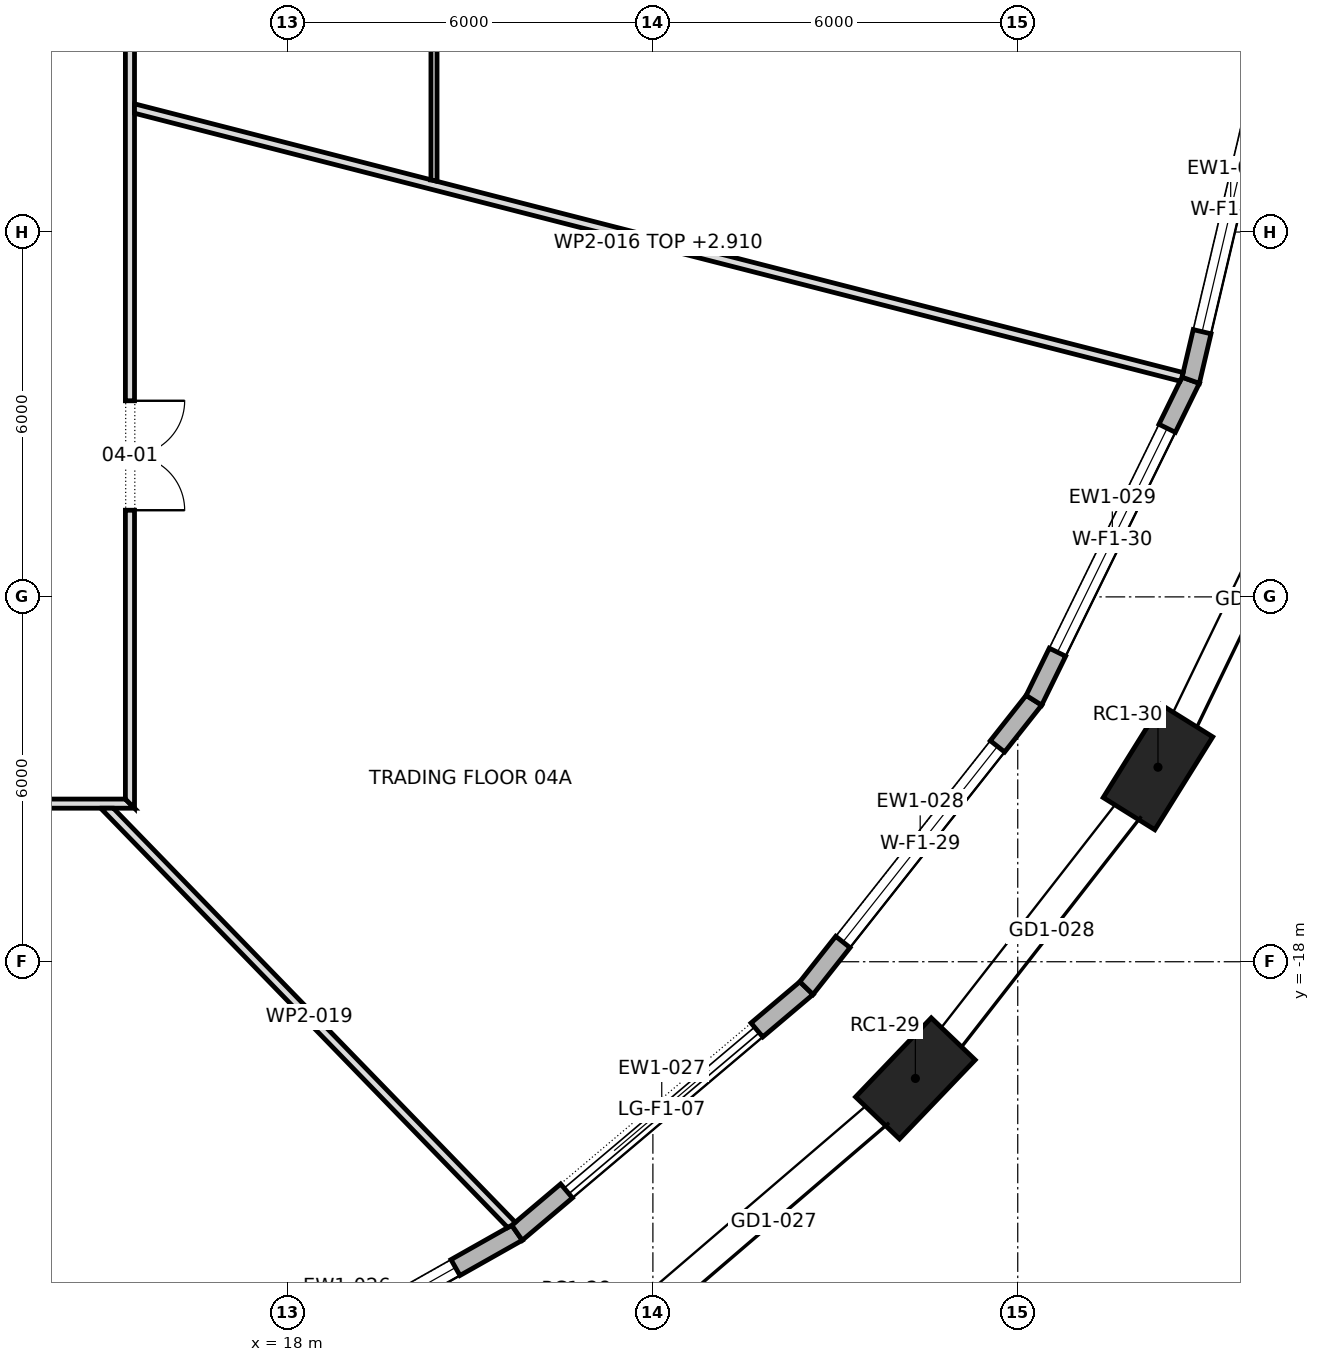
"""IFC4 building model, lengths in metres.
Left out: names, types, materials, properties, quantities, classifications, styles, units other than length and angle.
Written with IfcOpenShell. Run it as: python <this file> out.ifc"""

import sys

from ifc_helpers import new_model, si_unit, direction, frame, frame_2d, origin, origin_2d, place, context, subcontext, project, spatial, polyline, rectangle, outline, extrude, element, fill, save


model = new_model("IFC4")
c1 = context("Model", 3, precision=1e-05, world=origin(), true_north=direction((0.0, 1.0)))
c2 = subcontext(c1, "Body", "Model", "MODEL_VIEW")
j1 = project(units=[si_unit("LENGTHUNIT", "METRE"), si_unit("PLANEANGLEUNIT", "RADIAN")], contexts=[c1])
p1 = place(None, origin())
s1 = spatial("IfcSite", under=j1, at=p1, CompositionType="ELEMENT")
p2 = place(p1, origin())
s2 = spatial("IfcBuilding", under=s1, at=p2, CompositionType="ELEMENT")
p3 = place(p2, frame((0.0, 0.0, 69.7)))
s3 = spatial("IfcBuildingStorey", under=s2, at=p3, CompositionType="ELEMENT", Elevation=69.7)
for number, where, z_axis, x_axis in (
    (1, (28.317, -19.919, 0.0), (0.0, 0.0, 1.0), (0.692, 0.722, 0.0)),
    (2, (32.306, -14.801, 0.0), (0.0, 0.0, 1.0), (0.529, 0.849, 0.0)),
):
    element("IfcColumn", number, at=place(p3, frame(where, z_axis=z_axis, x_axis=x_axis)), inside=s3, PredefinedType="COLUMN", context=c2, shape_type="SweptSolid", body=[
        extrude(rectangle(XDim=1.8, YDim=1.0, at=origin_2d()), origin(), (0.0, 0.0, 1.0), 4.2),
    ])
p4 = place(p3, frame((16.172, -25.617, 0.0), z_axis=(0.0, 0.0, 1.0), x_axis=(0.870673928577, 0.491860661262, 0.0)))
e3 = element("IfcWall", 3, at=p4, inside=s3, PredefinedType="STANDARD", context=c2, shape_type="SweptSolid", body=[
    extrude(outline(polyline([(-0.013, -0.15), (6.439, -0.15), (6.411, 0.15), (0.013, 0.15), (-0.013, -0.15)])), origin(), (0.0, 0.0, 1.0), 3.9),
])
p5 = place(p4, frame((1.163, 0.0, 0.6)))
e4 = element("IfcOpeningElement", 4, at=p5, cuts=e3, PredefinedType="OPENING", context=c2, shape_type="SweptSolid", body=[
    extrude(rectangle(XDim=4.1, YDim=2.85, at=frame_2d((2.05, 1.425))), frame((0.0, 0.162, 0.0), z_axis=(0.0, -1.0, 0.0), x_axis=(1.0, 0.0, 0.0)), (0.0, 0.0, 1.0), 0.324),
])
p6 = place(p3, frame((21.766, -22.457, 0.0), z_axis=(0.0, 0.0, 1.0), x_axis=(0.763655167989, 0.645624336905, 0.0)))
e5 = element("IfcWall", 5, at=p6, inside=s3, PredefinedType="STANDARD", context=c2, shape_type="SweptSolid", body=[
    extrude(outline(polyline([(-0.014, -0.15), (6.247, -0.15), (6.217, 0.15), (0.014, 0.15), (-0.014, -0.15)])), origin(), (0.0, 0.0, 1.0), 3.9),
])
p7 = place(p6, frame((1.066, 0.0, 0.0)))
e6 = element("IfcOpeningElement", 6, at=p7, cuts=e5, PredefinedType="OPENING", context=c2, shape_type="SweptSolid", body=[
    extrude(rectangle(XDim=4.1, YDim=3.45, at=frame_2d((2.05, 1.725))), frame((0.0, 0.162, 0.0), z_axis=(0.0, -1.0, 0.0), x_axis=(1.0, 0.0, 0.0)), (0.0, 0.0, 1.0), 0.324),
])
p8 = place(p3, frame((26.525, -18.434, 0.0), z_axis=(0.0, 0.0, 1.0), x_axis=(0.620065339223, 0.784550173727, 0.0)))
e7 = element("IfcWall", 7, at=p8, inside=s3, PredefinedType="STANDARD", context=c2, shape_type="SweptSolid", body=[
    extrude(outline(polyline([(-0.015, -0.15), (6.05, -0.15), (6.018, 0.15), (0.015, 0.15), (-0.015, -0.15)])), origin(), (0.0, 0.0, 1.0), 3.9),
])
p9 = place(p8, frame((0.967, 0.0, 0.6)))
e8 = element("IfcOpeningElement", 8, at=p9, cuts=e7, PredefinedType="OPENING", context=c2, shape_type="SweptSolid", body=[
    extrude(rectangle(XDim=4.1, YDim=2.85, at=frame_2d((2.05, 1.425))), frame((0.0, 0.162, 0.0), z_axis=(0.0, -1.0, 0.0), x_axis=(1.0, 0.0, 0.0)), (0.0, 0.0, 1.0), 0.324),
])
p10 = place(p3, frame((30.266, -13.7, 0.0), z_axis=(0.0, 0.0, 1.0), x_axis=(0.439949735177, 0.898022399786, 0.0)))
e9 = element("IfcWall", 9, at=p10, inside=s3, PredefinedType="STANDARD", context=c2, shape_type="SweptSolid", body=[
    extrude(outline(polyline([(-0.016, -0.15), (5.877, -0.15), (5.843, 0.15), (0.016, 0.15), (-0.016, -0.15)])), origin(), (0.0, 0.0, 1.0), 3.9),
])
p11 = place(p10, frame((0.88, 0.0, 0.6)))
e10 = element("IfcOpeningElement", 10, at=p11, cuts=e9, PredefinedType="OPENING", context=c2, shape_type="SweptSolid", body=[
    extrude(rectangle(XDim=4.1, YDim=2.85, at=frame_2d((2.05, 1.425))), frame((0.0, 0.162, 0.0), z_axis=(0.0, -1.0, 0.0), x_axis=(1.0, 0.0, 0.0)), (0.0, 0.0, 1.0), 0.324),
])
p12 = place(p3, frame((32.844, -8.438, 0.0), z_axis=(0.0, 0.0, 1.0), x_axis=(0.22905355604, 0.973413821797, 0.0)))
e11 = element("IfcWall", 11, at=p12, inside=s3, PredefinedType="STANDARD", context=c2, shape_type="SweptSolid", body=[
    extrude(outline(polyline([(-0.017, -0.15), (5.758, -0.15), (5.723, 0.15), (0.017, 0.15), (-0.017, -0.15)])), origin(), (0.0, 0.0, 1.0), 3.9),
])
p13 = place(p12, frame((0.82, 0.0, 0.6)))
e12 = element("IfcOpeningElement", 12, at=p13, cuts=e11, PredefinedType="OPENING", context=c2, shape_type="SweptSolid", body=[
    extrude(rectangle(XDim=4.1, YDim=2.85, at=frame_2d((2.05, 1.425))), frame((0.0, 0.162, 0.0), z_axis=(0.0, -1.0, 0.0), x_axis=(1.0, 0.0, 0.0)), (0.0, 0.0, 1.0), 0.324),
])
p14 = place(p3, frame((-15.475, -15.4, 0.0), z_axis=(0.0, 0.0, 1.0), x_axis=(1.0, 0.0, 0.0)))
e13 = element("IfcWall", 13, at=p14, inside=s3, PredefinedType="PARTITIONING", context=c2, shape_type="SweptSolid", body=[
    extrude(outline(polyline([(0.0, -0.075), (1.935, -0.075), (3.869, -0.075), (5.803, -0.075), (7.738, -0.075), (9.672, -0.075), (11.606, -0.075), (13.541, -0.075), (15.475, -0.075), (17.409, -0.075), (19.344, -0.075), (21.278, -0.075), (23.212, -0.075), (25.147, -0.075), (27.081, -0.075), (29.016, -0.075), (30.95, -0.075), (30.8, 0.075), (28.885, 0.075), (26.969, 0.075), (25.053, 0.075), (23.138, 0.075), (21.222, 0.075), (19.306, 0.075), (17.391, 0.075), (15.475, 0.075), (13.56, 0.075), (11.644, 0.075), (9.728, 0.075), (7.812, 0.075), (5.897, 0.075), (3.981, 0.075), (2.066, 0.075), (0.15, 0.075), (0.0, -0.075)])), origin(), (0.0, 0.0, 1.0), 3.9),
])
p15 = place(p14, frame((2.577, 0.0, 0.0)))
e14 = element("IfcOpeningElement", 14, at=p15, cuts=e13, PredefinedType="OPENING", context=c2, shape_type="SweptSolid", body=[
    extrude(rectangle(XDim=1.8, YDim=2.1, at=frame_2d((0.9, 1.05))), frame((0.0, 0.087, 0.0), z_axis=(0.0, -1.0, 0.0), x_axis=(1.0, 0.0, 0.0)), (0.0, 0.0, 1.0), 0.174),
])
p16 = place(p14, frame((9.383, 0.0, 0.0)))
e15 = element("IfcOpeningElement", 15, at=p16, cuts=e13, PredefinedType="OPENING", context=c2, shape_type="SweptSolid", body=[
    extrude(rectangle(XDim=1.8, YDim=2.1, at=frame_2d((0.9, 1.05))), frame((0.0, 0.087, 0.0), z_axis=(0.0, -1.0, 0.0), x_axis=(1.0, 0.0, 0.0)), (0.0, 0.0, 1.0), 0.174),
])
p17 = place(p14, frame((21.155, 0.0, 0.0)))
e16 = element("IfcOpeningElement", 16, at=p17, cuts=e13, PredefinedType="OPENING", context=c2, shape_type="SweptSolid", body=[
    extrude(rectangle(XDim=1.8, YDim=2.1, at=frame_2d((0.9, 1.05))), frame((0.0, 0.087, 0.0), z_axis=(0.0, -1.0, 0.0), x_axis=(1.0, 0.0, 0.0)), (0.0, 0.0, 1.0), 0.174),
])
p18 = place(p3, frame((15.4, -15.475, 0.0), z_axis=(0.0, 0.0, 1.0), x_axis=(0.0, 1.0, 0.0)))
e17 = element("IfcWall", 17, at=p18, inside=s3, PredefinedType="PARTITIONING", context=c2, shape_type="SweptSolid", body=[
    extrude(outline(polyline([(0.0, -0.075), (1.935, -0.075), (3.869, -0.075), (5.803, -0.075), (7.738, -0.075), (9.672, -0.075), (11.606, -0.075), (13.541, -0.075), (15.475, -0.075), (17.409, -0.075), (19.344, -0.075), (21.278, -0.075), (23.212, -0.075), (25.147, -0.075), (27.081, -0.075), (29.016, -0.075), (30.95, -0.075), (30.8, 0.075), (28.885, 0.075), (26.969, 0.075), (25.053, 0.075), (23.138, 0.075), (21.222, 0.075), (19.306, 0.075), (17.391, 0.075), (15.475, 0.075), (13.56, 0.075), (11.644, 0.075), (9.728, 0.075), (7.812, 0.075), (5.897, 0.075), (3.981, 0.075), (2.066, 0.075), (0.15, 0.075), (0.0, -0.075)])), origin(), (0.0, 0.0, 1.0), 3.9),
])
p19 = place(p18, frame((4.9, 0.0, 0.0)))
e18 = element("IfcOpeningElement", 18, at=p19, cuts=e17, PredefinedType="OPENING", context=c2, shape_type="SweptSolid", body=[
    extrude(rectangle(XDim=1.8, YDim=2.1, at=frame_2d((0.9, 1.05))), frame((0.0, 0.087, 0.0), z_axis=(0.0, -1.0, 0.0), x_axis=(1.0, 0.0, 0.0)), (0.0, 0.0, 1.0), 0.174),
])
p20 = place(p18, frame((14.975, 0.0, 0.0)))
e19 = element("IfcOpeningElement", 19, at=p20, cuts=e17, PredefinedType="OPENING", context=c2, shape_type="SweptSolid", body=[
    extrude(rectangle(XDim=1.0, YDim=2.1, at=frame_2d((0.5, 1.05))), frame((0.0, 0.087, 0.0), z_axis=(0.0, -1.0, 0.0), x_axis=(1.0, 0.0, 0.0)), (0.0, 0.0, 1.0), 0.174),
])
p21 = place(p18, frame((24.25, 0.0, 0.0)))
e20 = element("IfcOpeningElement", 20, at=p21, cuts=e17, PredefinedType="OPENING", context=c2, shape_type="SweptSolid", body=[
    extrude(rectangle(XDim=1.8, YDim=2.1, at=frame_2d((0.9, 1.05))), frame((0.0, 0.087, 0.0), z_axis=(0.0, -1.0, 0.0), x_axis=(1.0, 0.0, 0.0)), (0.0, 0.0, 1.0), 0.174),
])
p22 = place(p3, frame((15.457, -3.965, 0.0), z_axis=(0.0, 0.0, 1.0), x_axis=(0.968702688789, -0.248223892349, 0.0)))
e21 = element("IfcWall", 21, at=p22, inside=s3, PredefinedType="PARTITIONING", context=c2, shape_type="SweptSolid", body=[
    extrude(outline(polyline([(0.038, -0.075), (2.01, -0.075), (3.982, -0.075), (5.955, -0.075), (7.927, -0.075), (9.899, -0.075), (11.872, -0.075), (13.844, -0.075), (15.816, -0.075), (17.788, -0.075), (17.801, -0.013), (17.801, 0.075), (15.978, 0.075), (14.155, 0.075), (12.331, 0.075), (10.508, 0.075), (8.685, 0.075), (6.861, 0.075), (5.038, 0.075), (5.032, 0.073), (5.032, 0.075), (3.355, 0.075), (1.677, 0.075), (0.0, 0.075), (0.0, 0.073), (0.038, -0.075)])), origin(), (0.0, 0.0, 1.0), 2.91),
])
p23 = place(p3, frame((20.4, 5.165, 0.0), z_axis=(0.0, 0.0, 1.0), x_axis=(0.0, -1.0, 0.0)))
e22 = element("IfcWall", 22, at=p23, inside=s3, PredefinedType="PARTITIONING", context=c2, shape_type="SweptSolid", body=[
    extrude(outline(polyline([(0.025, -0.05), (1.739, -0.05), (3.452, -0.05), (5.166, -0.05), (6.879, -0.05), (8.593, -0.05), (10.306, -0.05), (10.332, 0.05), (10.332, 0.05), (8.61, 0.05), (6.888, 0.05), (5.166, 0.05), (3.444, 0.05), (1.722, 0.05), (0.0, 0.05), (0.0, 0.049), (0.025, -0.05)])), origin(), (0.0, 0.0, 1.0), 3.9),
])
p24 = place(p23, frame((4.715, 0.0, 0.0)))
e23 = element("IfcOpeningElement", 23, at=p24, cuts=e22, PredefinedType="OPENING", context=c2, shape_type="SweptSolid", body=[
    extrude(rectangle(XDim=0.9, YDim=2.1, at=frame_2d((0.45, 1.05))), frame((0.0, 0.062, 0.0), z_axis=(0.0, -1.0, 0.0), x_axis=(1.0, 0.0, 0.0)), (0.0, 0.0, 1.0), 0.124),
])
p25 = place(p3, frame((21.683, -22.337, 0.0), z_axis=(0.0, 0.0, 1.0), x_axis=(-0.696500320059, 0.71755648151, 0.0)))
e24 = element("IfcWall", 24, at=p25, inside=s3, PredefinedType="PARTITIONING", context=c2, shape_type="SweptSolid", body=[
    extrude(outline(polyline([(0.0, -0.075), (1.898, -0.075), (3.796, -0.075), (5.694, -0.075), (7.592, -0.075), (9.49, -0.075), (9.635, 0.074), (9.635, 0.075), (7.713, 0.075), (5.791, 0.075), (3.869, 0.075), (1.947, 0.075), (0.024, 0.075), (0.005, 0.0), (0.0, -0.072), (0.0, -0.075)])), origin(), (0.0, 0.0, 1.0), 3.9),
])
p26 = place(p5, origin())
e25 = element("IfcWindow", 25, at=p26, inside=s3, PartitioningType="TRIPLE_PANEL_VERTICAL", PredefinedType="WINDOW", context=c2, shape_type="SweptSolid", body=[
    extrude(rectangle(XDim=4.1, YDim=2.85, at=frame_2d((2.05, 1.425))), frame((0.0, 0.03, 0.0), z_axis=(0.0, -1.0, 0.0), x_axis=(1.0, 0.0, 0.0)), (0.0, 0.0, 1.0), 0.06),
])
fill(e4, e25)
p27 = place(p7, origin())
e26 = element("IfcDoor", 26, at=p27, inside=s3, OperationType="DOUBLE_DOOR_SLIDING", PredefinedType="DOOR", context=c2, shape_type="SweptSolid", body=[
    extrude(rectangle(XDim=4.1, YDim=3.45, at=frame_2d((2.05, 1.725))), frame((0.0, 0.025, 0.0), z_axis=(0.0, -1.0, 0.0), x_axis=(1.0, 0.0, 0.0)), (0.0, 0.0, 1.0), 0.05),
])
fill(e6, e26)
p28 = place(p9, origin())
e27 = element("IfcWindow", 27, at=p28, inside=s3, PartitioningType="TRIPLE_PANEL_VERTICAL", PredefinedType="WINDOW", context=c2, shape_type="SweptSolid", body=[
    extrude(rectangle(XDim=4.1, YDim=2.85, at=frame_2d((2.05, 1.425))), frame((0.0, 0.03, 0.0), z_axis=(0.0, -1.0, 0.0), x_axis=(1.0, 0.0, 0.0)), (0.0, 0.0, 1.0), 0.06),
])
fill(e8, e27)
p29 = place(p11, origin())
e28 = element("IfcWindow", 28, at=p29, inside=s3, PartitioningType="TRIPLE_PANEL_VERTICAL", PredefinedType="WINDOW", context=c2, shape_type="SweptSolid", body=[
    extrude(rectangle(XDim=4.1, YDim=2.85, at=frame_2d((2.05, 1.425))), frame((0.0, 0.03, 0.0), z_axis=(0.0, -1.0, 0.0), x_axis=(1.0, 0.0, 0.0)), (0.0, 0.0, 1.0), 0.06),
])
fill(e10, e28)
p30 = place(p13, origin())
e29 = element("IfcWindow", 29, at=p30, inside=s3, PartitioningType="TRIPLE_PANEL_VERTICAL", PredefinedType="WINDOW", context=c2, shape_type="SweptSolid", body=[
    extrude(rectangle(XDim=4.1, YDim=2.85, at=frame_2d((2.05, 1.425))), frame((0.0, 0.03, 0.0), z_axis=(0.0, -1.0, 0.0), x_axis=(1.0, 0.0, 0.0)), (0.0, 0.0, 1.0), 0.06),
])
fill(e12, e29)
p31 = place(p19, frame((1.8, 0.0, 0.0), z_axis=(0.0, 0.0, 1.0), x_axis=(-1.0, 0.0, 0.0)))
e30 = element("IfcDoor", 30, at=p31, inside=s3, OperationType="DOUBLE_DOOR_SINGLE_SWING", PredefinedType="DOOR", context=c2, shape_type="SweptSolid", body=[
    extrude(rectangle(XDim=1.8, YDim=2.1, at=frame_2d((0.9, 1.05))), frame((0.0, 0.025, 0.0), z_axis=(0.0, -1.0, 0.0), x_axis=(1.0, 0.0, 0.0)), (0.0, 0.0, 1.0), 0.05),
])
fill(e18, e30)
save(model, sys.argv[1])
